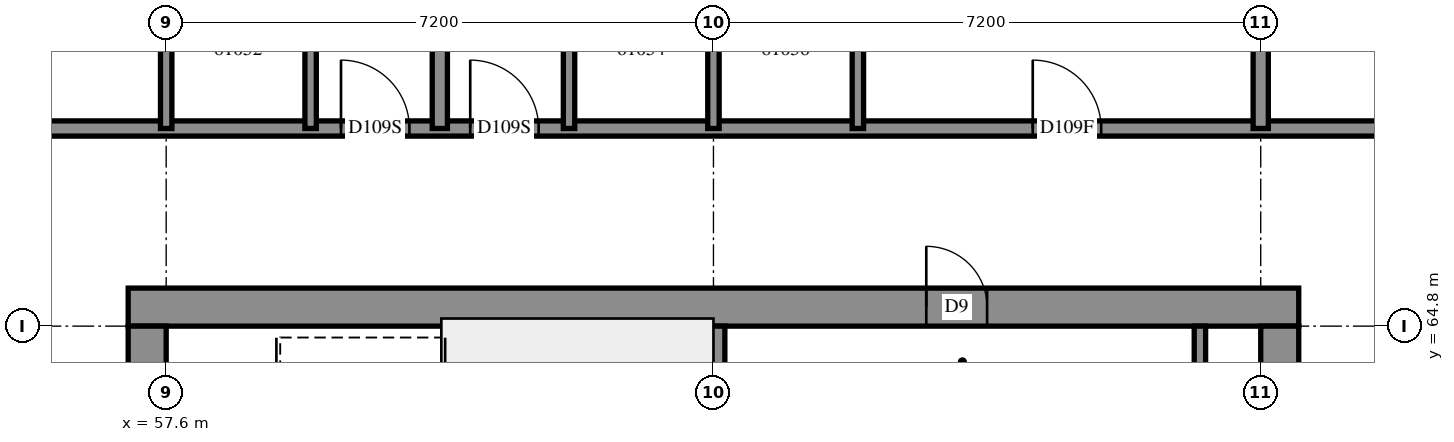
"""IFC4 building model, lengths in metres.
Left out: names, types, materials, properties, quantities, classifications, styles, units other than length and angle.
Written with IfcOpenShell. Run it as: python <this file> out.ifc"""

import sys

from ifc_helpers import new_model, si_unit, direction, frame, frame_2d, origin, place, context, subcontext, project, spatial, rectangle, extrude, element, fill, save


model = new_model("IFC4")
c1 = context("Model", 3, precision=1e-05, world=origin(), true_north=direction((0.0, 1.0)))
c2 = subcontext(c1, "Body", "Model", "MODEL_VIEW")
j1 = project(units=[si_unit("LENGTHUNIT", "METRE"), si_unit("PLANEANGLEUNIT", "RADIAN")], contexts=[c1])
p1 = place(None, origin())
s1 = spatial("IfcSite", under=j1, at=p1, CompositionType="ELEMENT")
p2 = place(p1, origin())
s2 = spatial("IfcBuilding", under=s1, at=p2, CompositionType="ELEMENT")
p3 = place(p2, frame((0.0, 0.0, 223.6)))
s3 = spatial("IfcBuildingStorey", under=s2, at=p3, CompositionType="ELEMENT", Elevation=223.6)
p4 = place(p3, frame((57.1, 65.05, -0.3), z_axis=(0.0, 0.0, 1.0), x_axis=(1.0, 0.0, 0.0)))
e1 = element("IfcWall", 1, at=p4, inside=s3, PredefinedType="SHEAR", context=c2, shape_type="SweptSolid", body=[
    extrude(rectangle(XDim=15.4, YDim=0.5, at=frame_2d((7.7, 0.0))), origin(), (0.0, 0.0, 1.0), 2.7),
])
p5 = place(p4, frame((10.5, 0.0, 0.3)))
e2 = element("IfcOpeningElement", 2, at=p5, cuts=e1, PredefinedType="OPENING", context=c2, shape_type="SweptSolid", body=[
    extrude(rectangle(XDim=0.8, YDim=2.1, at=frame_2d((0.4, 1.05))), frame((0.0, 0.26, 0.0), z_axis=(0.0, -1.0, 0.0), x_axis=(1.0, 0.0, 0.0)), (0.0, 0.0, 1.0), 0.52),
])
p6 = place(p3, frame((57.35, 50.4, -0.3), z_axis=(0.0, 0.0, 1.0), x_axis=(0.0, 1.0, 0.0)))
e3 = element("IfcWall", 3, at=p6, inside=s3, PredefinedType="SHEAR", context=c2, shape_type="SweptSolid", body=[
    extrude(rectangle(XDim=14.4, YDim=0.5, at=frame_2d((7.2, 0.0))), origin(), (0.0, 0.0, 1.0), 2.7),
])
p7 = place(p6, frame((4.55, 0.0, 0.3)))
e4 = element("IfcOpeningElement", 4, at=p7, cuts=e3, PredefinedType="OPENING", context=c2, shape_type="SweptSolid", body=[
    extrude(rectangle(XDim=1.1, YDim=2.1, at=frame_2d((0.55, 1.05))), frame((0.0, 0.26, 0.0), z_axis=(0.0, -1.0, 0.0), x_axis=(1.0, 0.0, 0.0)), (0.0, 0.0, 1.0), 0.52),
])
p8 = place(p6, frame((11.35, 0.0, 0.3)))
e5 = element("IfcOpeningElement", 5, at=p8, cuts=e3, PredefinedType="OPENING", context=c2, shape_type="SweptSolid", body=[
    extrude(rectangle(XDim=1.1, YDim=2.1, at=frame_2d((0.55, 1.05))), frame((0.0, 0.26, 0.0), z_axis=(0.0, -1.0, 0.0), x_axis=(1.0, 0.0, 0.0)), (0.0, 0.0, 1.0), 0.52),
])
p9 = place(p3, frame((72.25, 50.4, -0.3), z_axis=(0.0, 0.0, 1.0), x_axis=(0.0, 1.0, 0.0)))
e6 = element("IfcWall", 6, at=p9, inside=s3, PredefinedType="SHEAR", context=c2, shape_type="SweptSolid", body=[
    extrude(rectangle(XDim=14.4, YDim=0.5, at=frame_2d((7.2, 0.0))), origin(), (0.0, 0.0, 1.0), 2.7),
])
p10 = place(p9, frame((4.55, 0.0, 0.3)))
e7 = element("IfcOpeningElement", 7, at=p10, cuts=e6, PredefinedType="OPENING", context=c2, shape_type="SweptSolid", body=[
    extrude(rectangle(XDim=1.1, YDim=2.1, at=frame_2d((0.55, 1.05))), frame((0.0, 0.26, 0.0), z_axis=(0.0, -1.0, 0.0), x_axis=(1.0, 0.0, 0.0)), (0.0, 0.0, 1.0), 0.52),
])
p11 = place(p9, frame((11.35, 0.0, 0.3)))
e8 = element("IfcOpeningElement", 8, at=p11, cuts=e6, PredefinedType="OPENING", context=c2, shape_type="SweptSolid", body=[
    extrude(rectangle(XDim=1.1, YDim=2.1, at=frame_2d((0.55, 1.05))), frame((0.0, 0.26, 0.0), z_axis=(0.0, -1.0, 0.0), x_axis=(1.0, 0.0, 0.0)), (0.0, 0.0, 1.0), 0.52),
])
p12 = place(p3, frame((64.8, 60.6, 0.0), z_axis=(0.0, 0.0, 1.0), x_axis=(0.0, 1.0, 0.0)))
e9 = element("IfcWall", 9, at=p12, inside=s3, PredefinedType="SOLIDWALL", context=c2, shape_type="SweptSolid", body=[
    extrude(rectangle(XDim=4.2, YDim=0.3, at=frame_2d((2.1, 0.0))), origin(), (0.0, 0.0, 1.0), 3.1),
])
p13 = place(p3, frame((71.2, 63.78, 0.0), z_axis=(0.0, 0.0, 1.0), x_axis=(0.0, 1.0, 0.0)))
e10 = element("IfcWall", 10, at=p13, inside=s3, PredefinedType="PARTITIONING", context=c2, shape_type="SweptSolid", body=[
    extrude(rectangle(XDim=1.02, YDim=0.15, at=frame_2d((0.51, 0.0))), origin(), (0.0, 0.0, 1.0), 3.1),
])
p14 = place(p3, frame((55.0, 67.4, 0.0), z_axis=(0.0, 0.0, 1.0), x_axis=(1.0, 0.0, 0.0)))
e11 = element("IfcWall", 11, at=p14, inside=s3, PredefinedType="PARTITIONING", context=c2, shape_type="SweptSolid", body=[
    extrude(rectangle(XDim=19.6, YDim=0.2, at=frame_2d((9.8, 0.0))), origin(), (0.0, 0.0, 1.0), 3.1),
])
p15 = place(p14, frame((4.9, 0.0, 0.0)))
e12 = element("IfcOpeningElement", 12, at=p15, cuts=e11, PredefinedType="OPENING", context=c2, shape_type="SweptSolid", body=[
    extrude(rectangle(XDim=0.9, YDim=2.1, at=frame_2d((0.45, 1.05))), frame((0.0, 0.11, 0.0), z_axis=(0.0, -1.0, 0.0), x_axis=(1.0, 0.0, 0.0)), (0.0, 0.0, 1.0), 0.22),
])
p16 = place(p14, frame((6.6, 0.0, 0.0)))
e13 = element("IfcOpeningElement", 13, at=p16, cuts=e11, PredefinedType="OPENING", context=c2, shape_type="SweptSolid", body=[
    extrude(rectangle(XDim=0.9, YDim=2.1, at=frame_2d((0.45, 1.05))), frame((0.0, 0.11, 0.0), z_axis=(0.0, -1.0, 0.0), x_axis=(1.0, 0.0, 0.0)), (0.0, 0.0, 1.0), 0.22),
])
p17 = place(p14, frame((14.001, 0.0, 0.0)))
e14 = element("IfcOpeningElement", 14, at=p17, cuts=e11, PredefinedType="OPENING", context=c2, shape_type="SweptSolid", body=[
    extrude(rectangle(XDim=0.9, YDim=2.1, at=frame_2d((0.45, 1.05))), frame((0.0, 0.11, 0.0), z_axis=(0.0, -1.0, 0.0), x_axis=(1.0, 0.0, 0.0)), (0.0, 0.0, 1.0), 0.22),
])
p18 = place(p3, frame((61.2, 67.4, 0.0), z_axis=(0.0, 0.0, 1.0), x_axis=(0.0, 1.0, 0.0)))
e15 = element("IfcWall", 15, at=p18, inside=s3, PredefinedType="PARTITIONING", context=c2, shape_type="SweptSolid", body=[
    extrude(rectangle(XDim=5.328, YDim=0.2, at=frame_2d((2.664, 0.0))), origin(), (0.0, 0.0, 1.0), 3.1),
])
p19 = place(p3, frame((72.0, 67.4, 0.0), z_axis=(0.0, 0.0, 1.0), x_axis=(0.0, 1.0, 0.0)))
e16 = element("IfcWall", 16, at=p19, inside=s3, PredefinedType="PARTITIONING", context=c2, shape_type="SweptSolid", body=[
    extrude(rectangle(XDim=4.096, YDim=0.2, at=frame_2d((2.048, 0.0))), origin(), (0.0, 0.0, 1.0), 3.1),
])
for number, where, z_axis, x_axis in (
    (17, (59.5, 67.4, 0.0), (0.0, 0.0, 1.0), (0.0, 1.0, 0.0)),
    (18, (57.6, 67.4, 0.0), (0.0, 0.0, 1.0), (0.0, 1.0, 0.0)),
    (19, (62.9, 67.4, 0.0), (0.0, 0.0, 1.0), (0.0, 1.0, 0.0)),
    (20, (64.8, 67.4, 0.0), (0.0, 0.0, 1.0), (0.0, 1.0, 0.0)),
    (21, (66.7, 67.4, 0.0), (0.0, 0.0, 1.0), (0.0, 1.0, 0.0)),
):
    element("IfcWall", number, at=place(p3, frame(where, z_axis=z_axis, x_axis=x_axis)), inside=s3, PredefinedType="PARTITIONING", context=c2, shape_type="SweptSolid", body=[
        extrude(rectangle(XDim=2.4, YDim=0.15, at=frame_2d((1.2, 0.0))), origin(), (0.0, 0.0, 1.0), 3.1),
    ])
p20 = place(p5, origin())
e22 = element("IfcDoor", 22, at=p20, inside=s3, OperationType="SINGLE_SWING_RIGHT", PredefinedType="DOOR", context=c2, shape_type="SweptSolid", body=[
    extrude(rectangle(XDim=0.8, YDim=2.1, at=frame_2d((0.4, 1.05))), frame((0.0, 0.025, 0.0), z_axis=(0.0, -1.0, 0.0), x_axis=(1.0, 0.0, 0.0)), (0.0, 0.0, 1.0), 0.05),
])
fill(e2, e22)
p21 = place(p15, origin())
e23 = element("IfcDoor", 23, at=p21, inside=s3, OperationType="SINGLE_SWING_RIGHT", PredefinedType="DOOR", context=c2, shape_type="SweptSolid", body=[
    extrude(rectangle(XDim=0.9, YDim=2.1, at=frame_2d((0.45, 1.05))), frame((0.0, 0.025, 0.0), z_axis=(0.0, -1.0, 0.0), x_axis=(1.0, 0.0, 0.0)), (0.0, 0.0, 1.0), 0.05),
])
fill(e12, e23)
p22 = place(p16, origin())
e24 = element("IfcDoor", 24, at=p22, inside=s3, OperationType="SINGLE_SWING_LEFT", PredefinedType="DOOR", context=c2, shape_type="SweptSolid", body=[
    extrude(rectangle(XDim=0.9, YDim=2.1, at=frame_2d((0.45, 1.05))), frame((0.0, 0.025, 0.0), z_axis=(0.0, -1.0, 0.0), x_axis=(1.0, 0.0, 0.0)), (0.0, 0.0, 1.0), 0.05),
])
fill(e13, e24)
p23 = place(p17, origin())
e25 = element("IfcDoor", 25, at=p23, inside=s3, OperationType="SINGLE_SWING_RIGHT", PredefinedType="DOOR", context=c2, shape_type="SweptSolid", body=[
    extrude(rectangle(XDim=0.9, YDim=2.1, at=frame_2d((0.45, 1.05))), frame((0.0, 0.025, 0.0), z_axis=(0.0, -1.0, 0.0), x_axis=(1.0, 0.0, 0.0)), (0.0, 0.0, 1.0), 0.05),
])
fill(e14, e25)
save(model, sys.argv[1])
